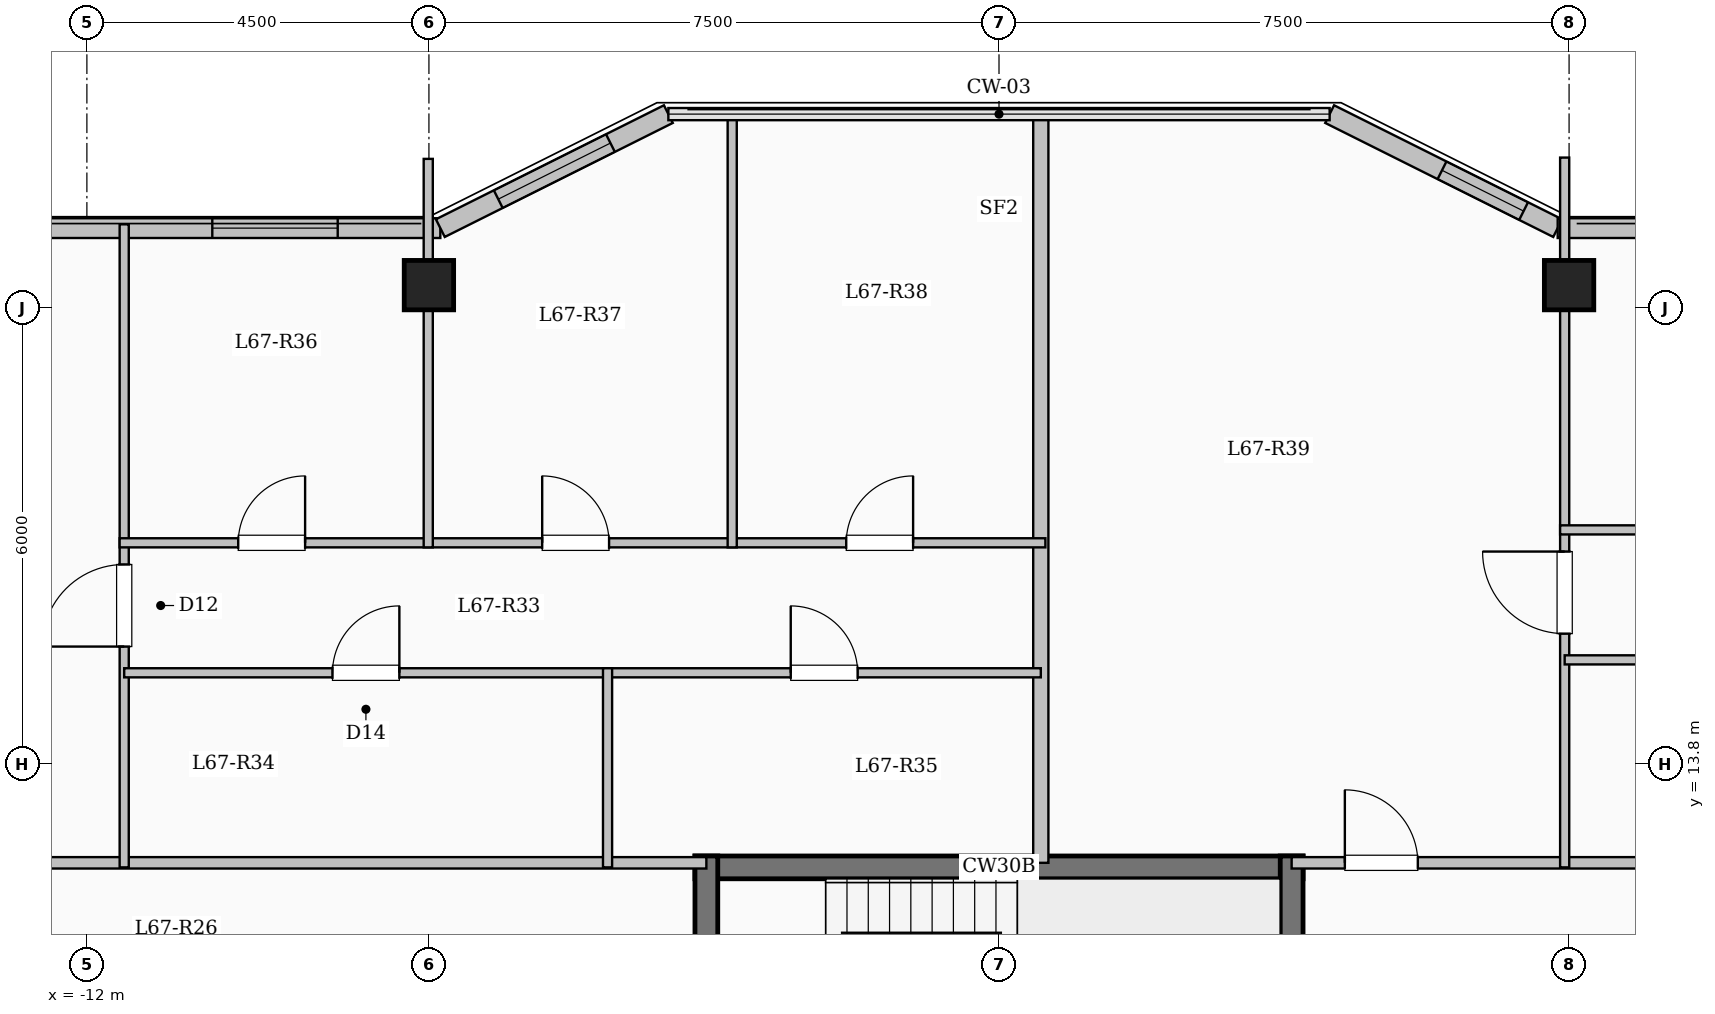
"""IFC4 building model, lengths in metres.
Left out: names, types, materials, properties, quantities, classifications, styles, units other than length and angle.
Written with IfcOpenShell. Run it as: python <this file> out.ifc"""

import sys

from ifc_helpers import new_model, si_unit, direction, frame, frame_2d, origin, origin_2d, place, context, subcontext, project, spatial, rectangle, extrude, element, fill, save


model = new_model("IFC4")
c1 = context("Model", 3, precision=1e-05, world=origin(), true_north=direction((0.0, 1.0)))
c2 = subcontext(c1, "Body", "Model", "MODEL_VIEW")
j1 = project(units=[si_unit("LENGTHUNIT", "METRE"), si_unit("PLANEANGLEUNIT", "RADIAN")], contexts=[c1])
p1 = place(None, origin())
s1 = spatial("IfcSite", under=j1, at=p1, CompositionType="ELEMENT")
p2 = place(p1, origin())
s2 = spatial("IfcBuilding", under=s1, at=p2, CompositionType="ELEMENT")
p3 = place(p2, frame((0.0, 0.0, 248.2)))
s3 = spatial("IfcBuildingStorey", under=s2, at=p3, CompositionType="ELEMENT", Elevation=248.2)
for number, where, z_axis, x_axis in (
    (1, (-7.5, 20.1, 0.0), (0.0, 0.0, 1.0), (1.0, 0.0, 0.0)),
    (2, (7.5, 20.1, 0.0), (0.0, 0.0, 1.0), (1.0, 0.0, 0.0)),
):
    element("IfcColumn", number, at=place(p3, frame(where, z_axis=z_axis, x_axis=x_axis)), inside=s3, PredefinedType="COLUMN", context=c2, shape_type="SweptSolid", body=[
        extrude(rectangle(XDim=0.65, YDim=0.65, at=origin_2d()), origin(), (0.0, 0.0, 1.0), 3.35),
    ])
p4 = place(p3, frame((-17.85, 20.85, 0.0), z_axis=(0.0, 0.0, 1.0), x_axis=(1.0, 0.0, 0.0)))
e3 = element("IfcWall", 3, at=p4, inside=s3, PredefinedType="SOLIDWALL", context=c2, shape_type="SweptSolid", body=[
    extrude(rectangle(XDim=10.5, YDim=0.26, at=frame_2d((5.25, 0.0))), origin(), (0.0, 0.0, 1.0), 3.1),
])
p5 = place(p4, frame((2.1, 0.0, 0.9)))
e4 = element("IfcOpeningElement", 4, at=p5, cuts=e3, PredefinedType="OPENING", context=c2, shape_type="SweptSolid", body=[
    extrude(rectangle(XDim=2.2, YDim=1.75, at=frame_2d((1.1, 0.875))), frame((0.0, 0.14, 0.0), z_axis=(0.0, -1.0, 0.0), x_axis=(1.0, 0.0, 0.0)), (0.0, 0.0, 1.0), 0.28),
])
p6 = place(p4, frame((7.5, 0.0, 0.9)))
e5 = element("IfcOpeningElement", 5, at=p6, cuts=e3, PredefinedType="OPENING", context=c2, shape_type="SweptSolid", body=[
    extrude(rectangle(XDim=1.65, YDim=1.6, at=frame_2d((0.825, 0.8))), frame((0.0, 0.14, 0.0), z_axis=(0.0, -1.0, 0.0), x_axis=(1.0, 0.0, 0.0)), (0.0, 0.0, 1.0), 0.28),
])
p7 = place(p3, frame((-7.35, 20.85, 0.0), z_axis=(0.0, 0.0, 1.0), x_axis=(0.894427191, 0.4472135955, 0.0)))
e6 = element("IfcWall", 6, at=p7, inside=s3, PredefinedType="SOLIDWALL", context=c2, shape_type="SweptSolid", body=[
    extrude(rectangle(XDim=3.354, YDim=0.26, at=frame_2d((1.677, 0.0))), origin(), (0.0, 0.0, 1.0), 3.1),
])
p8 = place(p7, frame((0.852, 0.0, 0.9)))
e7 = element("IfcOpeningElement", 7, at=p8, cuts=e6, PredefinedType="OPENING", context=c2, shape_type="SweptSolid", body=[
    extrude(rectangle(XDim=1.65, YDim=1.6, at=frame_2d((0.825, 0.8))), frame((0.0, 0.14, 0.0), z_axis=(0.0, -1.0, 0.0), x_axis=(1.0, 0.0, 0.0)), (0.0, 0.0, 1.0), 0.28),
])
p9 = place(p3, frame((4.35, 22.35, 0.0), z_axis=(0.0, 0.0, 1.0), x_axis=(0.894427191, -0.4472135955, 0.0)))
e8 = element("IfcWall", 8, at=p9, inside=s3, PredefinedType="SOLIDWALL", context=c2, shape_type="SweptSolid", body=[
    extrude(rectangle(XDim=3.354, YDim=0.26, at=frame_2d((1.677, 0.0))), origin(), (0.0, 0.0, 1.0), 3.1),
])
p10 = place(p9, frame((1.653, 0.0, 0.95)))
e9 = element("IfcOpeningElement", 9, at=p10, cuts=e8, PredefinedType="OPENING", context=c2, shape_type="SweptSolid", body=[
    extrude(rectangle(XDim=1.2, YDim=1.5, at=frame_2d((0.6, 0.75))), frame((0.0, 0.14, 0.0), z_axis=(0.0, -1.0, 0.0), x_axis=(1.0, 0.0, 0.0)), (0.0, 0.0, 1.0), 0.28),
])
p11 = place(p3, frame((7.35, 20.85, 0.0), z_axis=(0.0, 0.0, 1.0), x_axis=(1.0, 0.0, 0.0)))
e10 = element("IfcWall", 10, at=p11, inside=s3, PredefinedType="SOLIDWALL", context=c2, shape_type="SweptSolid", body=[
    extrude(rectangle(XDim=10.5, YDim=0.26, at=frame_2d((5.25, 0.0))), origin(), (0.0, 0.0, 1.0), 3.1),
])
p12 = place(p11, frame((1.825, 0.0, 0.9)))
e11 = element("IfcOpeningElement", 11, at=p12, cuts=e10, PredefinedType="OPENING", context=c2, shape_type="SweptSolid", body=[
    extrude(rectangle(XDim=1.65, YDim=1.6, at=frame_2d((0.825, 0.8))), frame((0.0, 0.14, 0.0), z_axis=(0.0, -1.0, 0.0), x_axis=(1.0, 0.0, 0.0)), (0.0, 0.0, 1.0), 0.28),
])
p13 = place(p11, frame((7.0, 0.0, 0.9)))
e12 = element("IfcOpeningElement", 12, at=p13, cuts=e10, PredefinedType="OPENING", context=c2, shape_type="SweptSolid", body=[
    extrude(rectangle(XDim=1.65, YDim=1.6, at=frame_2d((0.825, 0.8))), frame((0.0, 0.14, 0.0), z_axis=(0.0, -1.0, 0.0), x_axis=(1.0, 0.0, 0.0)), (0.0, 0.0, 1.0), 0.28),
])
p14 = place(p3, frame((-4.0, 12.44, 0.0), z_axis=(0.0, 0.0, 1.0), x_axis=(1.0, 0.0, 0.0)))
e13 = element("IfcWall", 13, at=p14, inside=s3, PredefinedType="SHEAR", context=c2, shape_type="SweptSolid", body=[
    extrude(rectangle(XDim=8.0, YDim=0.3, at=frame_2d((4.0, 0.0))), origin(), (0.0, 0.0, 1.0), 3.35),
])
for number, where, z_axis, x_axis in (
    (14, (-3.85, 9.0, 0.0), (0.0, 0.0, 1.0), (0.0, 1.0, 0.0)),
    (15, (3.85, 9.0, 0.0), (0.0, 0.0, 1.0), (0.0, 1.0, 0.0)),
):
    element("IfcWall", number, at=place(p3, frame(where, z_axis=z_axis, x_axis=x_axis)), inside=s3, PredefinedType="SHEAR", context=c2, shape_type="SweptSolid", body=[
        extrude(rectangle(XDim=3.59, YDim=0.3, at=frame_2d((1.795, 0.0))), origin(), (0.0, 0.0, 1.0), 3.35),
    ])
p15 = place(p3, frame((-17.75, 12.5, 0.0), z_axis=(0.0, 0.0, 1.0), x_axis=(1.0, 0.0, 0.0)))
e16 = element("IfcWall", 16, at=p15, inside=s3, PredefinedType="PARTITIONING", context=c2, shape_type="SweptSolid", body=[
    extrude(rectangle(XDim=13.9, YDim=0.15, at=frame_2d((6.95, 0.0))), origin(), (0.0, 0.0, 1.0), 3.1),
])
p16 = place(p15, frame((0.7, 0.0, 0.0)))
e17 = element("IfcOpeningElement", 17, at=p16, cuts=e16, PredefinedType="OPENING", context=c2, shape_type="SweptSolid", body=[
    extrude(rectangle(XDim=0.96, YDim=2.15, at=frame_2d((0.48, 1.075))), frame((0.0, 0.085, 0.0), z_axis=(0.0, -1.0, 0.0), x_axis=(1.0, 0.0, 0.0)), (0.0, 0.0, 1.0), 0.17),
])
p17 = place(p3, frame((3.85, 12.5, 0.0), z_axis=(0.0, 0.0, 1.0), x_axis=(1.0, 0.0, 0.0)))
e18 = element("IfcWall", 18, at=p17, inside=s3, PredefinedType="PARTITIONING", context=c2, shape_type="SweptSolid", body=[
    extrude(rectangle(XDim=13.9, YDim=0.15, at=frame_2d((6.95, 0.0))), origin(), (0.0, 0.0, 1.0), 3.1),
])
p18 = place(p17, frame((0.7, 0.0, 0.0)))
e19 = element("IfcOpeningElement", 19, at=p18, cuts=e18, PredefinedType="OPENING", context=c2, shape_type="SweptSolid", body=[
    extrude(rectangle(XDim=0.96, YDim=2.15, at=frame_2d((0.48, 1.075))), frame((0.0, 0.085, 0.0), z_axis=(0.0, -1.0, 0.0), x_axis=(1.0, 0.0, 0.0)), (0.0, 0.0, 1.0), 0.17),
])
p19 = place(p3, frame((0.55, 12.5, 0.0), z_axis=(0.0, 0.0, 1.0), x_axis=(0.0, 1.0, 0.0)))
e20 = element("IfcWall", 20, at=p19, inside=s3, PredefinedType="SOLIDWALL", context=c2, shape_type="SweptSolid", body=[
    extrude(rectangle(XDim=9.88, YDim=0.2, at=frame_2d((4.94, 0.0))), origin(), (0.0, 0.0, 1.0), 3.1),
])
p20 = place(p3, frame((-11.509, 12.44, 0.0), z_axis=(0.0, 0.0, 1.0), x_axis=(0.0, 1.0, 0.0)))
e21 = element("IfcWall", 21, at=p20, inside=s3, PredefinedType="PARTITIONING", context=c2, shape_type="SweptSolid", body=[
    extrude(rectangle(XDim=8.46, YDim=0.12, at=frame_2d((4.23, 0.0))), origin(), (0.0, 0.0, 1.0), 3.1),
])
p21 = place(p20, frame((2.905, 0.0, 0.0)))
e22 = element("IfcOpeningElement", 22, at=p21, cuts=e21, PredefinedType="OPENING", context=c2, shape_type="SweptSolid", body=[
    extrude(rectangle(XDim=1.08, YDim=2.15, at=frame_2d((0.54, 1.075))), frame((0.0, 0.07, 0.0), z_axis=(0.0, -1.0, 0.0), x_axis=(1.0, 0.0, 0.0)), (0.0, 0.0, 1.0), 0.14),
])
p22 = place(p3, frame((-11.509, 15.0, 0.0), z_axis=(0.0, 0.0, 1.0), x_axis=(1.0, 0.0, 0.0)))
e23 = element("IfcWall", 23, at=p22, inside=s3, PredefinedType="PARTITIONING", context=c2, shape_type="SweptSolid", body=[
    extrude(rectangle(XDim=6.359, YDim=0.12, at=frame_2d((3.18, 0.0))), origin(), (0.0, 0.0, 1.0), 3.1),
])
p23 = place(p22, frame((2.74, 0.0, 0.0)))
e24 = element("IfcOpeningElement", 24, at=p23, cuts=e23, PredefinedType="OPENING", context=c2, shape_type="SweptSolid", body=[
    extrude(rectangle(XDim=0.88, YDim=2.1, at=frame_2d((0.44, 1.05))), frame((0.0, 0.07, 0.0), z_axis=(0.0, -1.0, 0.0), x_axis=(1.0, 0.0, 0.0)), (0.0, 0.0, 1.0), 0.14),
])
p24 = place(p3, frame((-5.15, 15.0, 0.0), z_axis=(0.0, 0.0, 1.0), x_axis=(1.0, 0.0, 0.0)))
e25 = element("IfcWall", 25, at=p24, inside=s3, PredefinedType="PARTITIONING", context=c2, shape_type="SweptSolid", body=[
    extrude(rectangle(XDim=5.7, YDim=0.12, at=frame_2d((2.85, 0.0))), origin(), (0.0, 0.0, 1.0), 3.1),
])
p25 = place(p24, frame((2.41, 0.0, 0.0)))
e26 = element("IfcOpeningElement", 26, at=p25, cuts=e25, PredefinedType="OPENING", context=c2, shape_type="SweptSolid", body=[
    extrude(rectangle(XDim=0.88, YDim=2.1, at=frame_2d((0.44, 1.05))), frame((0.0, 0.07, 0.0), z_axis=(0.0, -1.0, 0.0), x_axis=(1.0, 0.0, 0.0)), (0.0, 0.0, 1.0), 0.14),
])
p26 = place(p3, frame((-11.569, 16.71, 0.0), z_axis=(0.0, 0.0, 1.0), x_axis=(1.0, 0.0, 0.0)))
e27 = element("IfcWall", 27, at=p26, inside=s3, PredefinedType="PARTITIONING", context=c2, shape_type="SweptSolid", body=[
    extrude(rectangle(XDim=12.179, YDim=0.12, at=frame_2d((6.09, 0.0))), origin(), (0.0, 0.0, 1.0), 2.785),
])
p27 = place(p26, frame((1.56, 0.0, 0.0)))
e28 = element("IfcOpeningElement", 28, at=p27, cuts=e27, PredefinedType="OPENING", context=c2, shape_type="SweptSolid", body=[
    extrude(rectangle(XDim=0.88, YDim=2.1, at=frame_2d((0.44, 1.05))), frame((0.0, 0.07, 0.0), z_axis=(0.0, -1.0, 0.0), x_axis=(1.0, 0.0, 0.0)), (0.0, 0.0, 1.0), 0.14),
])
p28 = place(p26, frame((5.559, 0.0, 0.0)))
e29 = element("IfcOpeningElement", 29, at=p28, cuts=e27, PredefinedType="OPENING", context=c2, shape_type="SweptSolid", body=[
    extrude(rectangle(XDim=0.88, YDim=2.1, at=frame_2d((0.44, 1.05))), frame((0.0, 0.07, 0.0), z_axis=(0.0, -1.0, 0.0), x_axis=(1.0, 0.0, 0.0)), (0.0, 0.0, 1.0), 0.14),
])
p29 = place(p26, frame((9.559, 0.0, 0.0)))
e30 = element("IfcOpeningElement", 30, at=p29, cuts=e27, PredefinedType="OPENING", context=c2, shape_type="SweptSolid", body=[
    extrude(rectangle(XDim=0.88, YDim=2.1, at=frame_2d((0.44, 1.05))), frame((0.0, 0.07, 0.0), z_axis=(0.0, -1.0, 0.0), x_axis=(1.0, 0.0, 0.0)), (0.0, 0.0, 1.0), 0.14),
])
p30 = place(p3, frame((-5.15, 12.44, 0.0), z_axis=(0.0, 0.0, 1.0), x_axis=(0.0, 1.0, 0.0)))
e31 = element("IfcWall", 31, at=p30, inside=s3, PredefinedType="PARTITIONING", context=c2, shape_type="SweptSolid", body=[
    extrude(rectangle(XDim=2.62, YDim=0.12, at=frame_2d((1.31, 0.0))), origin(), (0.0, 0.0, 1.0), 3.1),
])
p31 = place(p3, frame((-7.509, 16.65, 0.0), z_axis=(0.0, 0.0, 1.0), x_axis=(0.0, 1.0, 0.0)))
e32 = element("IfcWall", 32, at=p31, inside=s3, PredefinedType="PARTITIONING", context=c2, shape_type="SweptSolid", body=[
    extrude(rectangle(XDim=5.111, YDim=0.12, at=frame_2d((2.556, 0.0))), origin(), (0.0, 0.0, 1.0), 2.685),
])
p32 = place(p3, frame((-3.51, 16.65, 0.0), z_axis=(0.0, 0.0, 1.0), x_axis=(0.0, 1.0, 0.0)))
e33 = element("IfcWall", 33, at=p32, inside=s3, PredefinedType="PARTITIONING", context=c2, shape_type="SweptSolid", body=[
    extrude(rectangle(XDim=5.73, YDim=0.12, at=frame_2d((2.865, 0.0))), origin(), (0.0, 0.0, 1.0), 3.1),
])
p33 = place(p3, frame((7.442, 12.44, 0.0), z_axis=(0.0, 0.0, 1.0), x_axis=(0.0, 1.0, 0.0)))
e34 = element("IfcWall", 34, at=p33, inside=s3, PredefinedType="PARTITIONING", context=c2, shape_type="SweptSolid", body=[
    extrude(rectangle(XDim=9.338, YDim=0.12, at=frame_2d((4.669, 0.0))), origin(), (0.0, 0.0, 1.0), 2.685),
])
p34 = place(p33, frame((3.075, 0.0, 0.0)))
e35 = element("IfcOpeningElement", 35, at=p34, cuts=e34, PredefinedType="OPENING", context=c2, shape_type="SweptSolid", body=[
    extrude(rectangle(XDim=1.08, YDim=2.15, at=frame_2d((0.54, 1.075))), frame((0.0, 0.07, 0.0), z_axis=(0.0, -1.0, 0.0), x_axis=(1.0, 0.0, 0.0)), (0.0, 0.0, 1.0), 0.14),
])
p35 = place(p3, frame((7.442, 15.17, 0.0), z_axis=(0.0, 0.0, 1.0), x_axis=(1.0, 0.0, 0.0)))
e36 = element("IfcWall", 36, at=p35, inside=s3, PredefinedType="PARTITIONING", context=c2, shape_type="SweptSolid", body=[
    extrude(rectangle(XDim=5.841, YDim=0.12, at=frame_2d((2.92, 0.0))), origin(), (0.0, 0.0, 1.0), 3.1),
])
p36 = place(p35, frame((2.48, 0.0, 0.0)))
e37 = element("IfcOpeningElement", 37, at=p36, cuts=e36, PredefinedType="OPENING", context=c2, shape_type="SweptSolid", body=[
    extrude(rectangle(XDim=0.88, YDim=2.1, at=frame_2d((0.44, 1.05))), frame((0.0, 0.07, 0.0), z_axis=(0.0, -1.0, 0.0), x_axis=(1.0, 0.0, 0.0)), (0.0, 0.0, 1.0), 0.14),
])
p37 = place(p3, frame((7.382, 16.88, 0.0), z_axis=(0.0, 0.0, 1.0), x_axis=(1.0, 0.0, 0.0)))
e38 = element("IfcWall", 38, at=p37, inside=s3, PredefinedType="PARTITIONING", context=c2, shape_type="SweptSolid", body=[
    extrude(rectangle(XDim=10.428, YDim=0.12, at=frame_2d((5.214, 0.0))), origin(), (0.0, 0.0, 1.0), 2.785),
])
p38 = place(p37, frame((2.122, 0.0, 0.0)))
e39 = element("IfcOpeningElement", 39, at=p38, cuts=e38, PredefinedType="OPENING", context=c2, shape_type="SweptSolid", body=[
    extrude(rectangle(XDim=0.88, YDim=2.1, at=frame_2d((0.44, 1.05))), frame((0.0, 0.07, 0.0), z_axis=(0.0, -1.0, 0.0), x_axis=(1.0, 0.0, 0.0)), (0.0, 0.0, 1.0), 0.14),
])
p39 = place(p37, frame((7.246, 0.0, 0.0)))
e40 = element("IfcOpeningElement", 40, at=p39, cuts=e38, PredefinedType="OPENING", context=c2, shape_type="SweptSolid", body=[
    extrude(rectangle(XDim=0.88, YDim=2.1, at=frame_2d((0.44, 1.05))), frame((0.0, 0.07, 0.0), z_axis=(0.0, -1.0, 0.0), x_axis=(1.0, 0.0, 0.0)), (0.0, 0.0, 1.0), 0.14),
])
p40 = place(p6, origin())
e41 = element("IfcWindow", 41, at=p40, inside=s3, PartitioningType="SINGLE_PANEL", PredefinedType="WINDOW", context=c2, shape_type="SweptSolid", body=[
    extrude(rectangle(XDim=1.65, YDim=1.6, at=frame_2d((0.825, 0.8))), frame((0.0, 0.03, 0.0), z_axis=(0.0, -1.0, 0.0), x_axis=(1.0, 0.0, 0.0)), (0.0, 0.0, 1.0), 0.06),
])
fill(e5, e41)
p41 = place(p8, origin())
e42 = element("IfcWindow", 42, at=p41, inside=s3, PartitioningType="SINGLE_PANEL", PredefinedType="WINDOW", context=c2, shape_type="SweptSolid", body=[
    extrude(rectangle(XDim=1.65, YDim=1.6, at=frame_2d((0.825, 0.8))), frame((0.0, 0.03, 0.0), z_axis=(0.0, -1.0, 0.0), x_axis=(1.0, 0.0, 0.0)), (0.0, 0.0, 1.0), 0.06),
])
fill(e7, e42)
p42 = place(p10, origin())
e43 = element("IfcWindow", 43, at=p42, inside=s3, PartitioningType="SINGLE_PANEL", PredefinedType="WINDOW", context=c2, shape_type="SweptSolid", body=[
    extrude(rectangle(XDim=1.2, YDim=1.5, at=frame_2d((0.6, 0.75))), frame((0.0, 0.03, 0.0), z_axis=(0.0, -1.0, 0.0), x_axis=(1.0, 0.0, 0.0)), (0.0, 0.0, 1.0), 0.06),
])
fill(e9, e43)
p43 = place(p21, origin())
e44 = element("IfcDoor", 44, at=p43, inside=s3, OperationType="SINGLE_SWING_LEFT", PredefinedType="DOOR", context=c2, shape_type="SweptSolid", body=[
    extrude(rectangle(XDim=1.08, YDim=2.15, at=frame_2d((0.54, 1.075))), frame((0.0, 0.025, 0.0), z_axis=(0.0, -1.0, 0.0), x_axis=(1.0, 0.0, 0.0)), (0.0, 0.0, 1.0), 0.05),
])
fill(e22, e44)
p44 = place(p23, origin())
e45 = element("IfcDoor", 45, at=p44, inside=s3, OperationType="SINGLE_SWING_RIGHT", PredefinedType="DOOR", context=c2, shape_type="SweptSolid", body=[
    extrude(rectangle(XDim=0.88, YDim=2.1, at=frame_2d((0.44, 1.05))), frame((0.0, 0.025, 0.0), z_axis=(0.0, -1.0, 0.0), x_axis=(1.0, 0.0, 0.0)), (0.0, 0.0, 1.0), 0.05),
])
fill(e24, e45)
p45 = place(p25, origin())
e46 = element("IfcDoor", 46, at=p45, inside=s3, OperationType="SINGLE_SWING_LEFT", PredefinedType="DOOR", context=c2, shape_type="SweptSolid", body=[
    extrude(rectangle(XDim=0.88, YDim=2.1, at=frame_2d((0.44, 1.05))), frame((0.0, 0.025, 0.0), z_axis=(0.0, -1.0, 0.0), x_axis=(1.0, 0.0, 0.0)), (0.0, 0.0, 1.0), 0.05),
])
fill(e26, e46)
p46 = place(p27, origin())
e47 = element("IfcDoor", 47, at=p46, inside=s3, OperationType="SINGLE_SWING_RIGHT", PredefinedType="DOOR", context=c2, shape_type="SweptSolid", body=[
    extrude(rectangle(XDim=0.88, YDim=2.1, at=frame_2d((0.44, 1.05))), frame((0.0, 0.025, 0.0), z_axis=(0.0, -1.0, 0.0), x_axis=(1.0, 0.0, 0.0)), (0.0, 0.0, 1.0), 0.05),
])
fill(e28, e47)
p47 = place(p28, origin())
e48 = element("IfcDoor", 48, at=p47, inside=s3, OperationType="SINGLE_SWING_LEFT", PredefinedType="DOOR", context=c2, shape_type="SweptSolid", body=[
    extrude(rectangle(XDim=0.88, YDim=2.1, at=frame_2d((0.44, 1.05))), frame((0.0, 0.025, 0.0), z_axis=(0.0, -1.0, 0.0), x_axis=(1.0, 0.0, 0.0)), (0.0, 0.0, 1.0), 0.05),
])
fill(e29, e48)
p48 = place(p29, origin())
e49 = element("IfcDoor", 49, at=p48, inside=s3, OperationType="SINGLE_SWING_RIGHT", PredefinedType="DOOR", context=c2, shape_type="SweptSolid", body=[
    extrude(rectangle(XDim=0.88, YDim=2.1, at=frame_2d((0.44, 1.05))), frame((0.0, 0.025, 0.0), z_axis=(0.0, -1.0, 0.0), x_axis=(1.0, 0.0, 0.0)), (0.0, 0.0, 1.0), 0.05),
])
fill(e30, e49)
p49 = place(p18, origin())
e50 = element("IfcDoor", 50, at=p49, inside=s3, OperationType="SINGLE_SWING_LEFT", PredefinedType="DOOR", context=c2, shape_type="SweptSolid", body=[
    extrude(rectangle(XDim=0.96, YDim=2.15, at=frame_2d((0.48, 1.075))), frame((0.0, 0.025, 0.0), z_axis=(0.0, -1.0, 0.0), x_axis=(1.0, 0.0, 0.0)), (0.0, 0.0, 1.0), 0.05),
])
fill(e19, e50)
p50 = place(p34, origin())
e51 = element("IfcDoor", 51, at=p50, inside=s3, OperationType="SINGLE_SWING_RIGHT", PredefinedType="DOOR", context=c2, shape_type="SweptSolid", body=[
    extrude(rectangle(XDim=1.08, YDim=2.15, at=frame_2d((0.54, 1.075))), frame((0.0, 0.025, 0.0), z_axis=(0.0, -1.0, 0.0), x_axis=(1.0, 0.0, 0.0)), (0.0, 0.0, 1.0), 0.05),
])
fill(e35, e51)
save(model, sys.argv[1])
